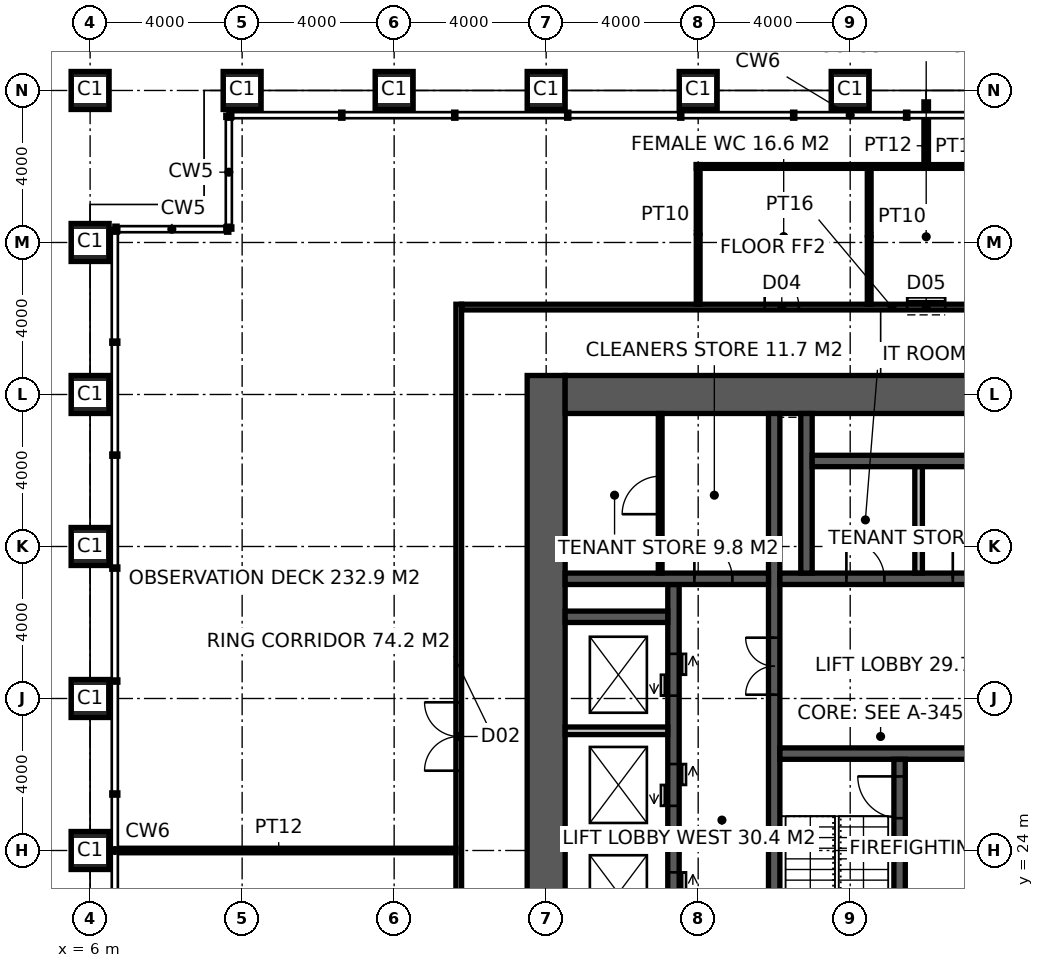
"""IFC4 building model, lengths in metres.
Left out: names, types, materials, properties, quantities, classifications, styles, units other than length and angle.
Written with IfcOpenShell. Run it as: python <this file> out.ifc"""

import sys

from ifc_helpers import new_model, si_unit, direction, frame, frame_2d, origin, origin_2d, place, context, subcontext, project, spatial, rectangle, hollow_rectangle, extrude, element, fill, save


model = new_model("IFC4")
c1 = context("Model", 3, precision=1e-05, world=origin(), true_north=direction((0.0, 1.0)))
c2 = subcontext(c1, "Body", "Model", "MODEL_VIEW")
j1 = project(units=[si_unit("LENGTHUNIT", "METRE"), si_unit("PLANEANGLEUNIT", "RADIAN")], contexts=[c1])
p1 = place(None, origin())
s1 = spatial("IfcSite", under=j1, at=p1, CompositionType="ELEMENT")
p2 = place(p1, origin())
s2 = spatial("IfcBuilding", under=s1, at=p2, CompositionType="ELEMENT")
p3 = place(p2, frame((0.0, 0.0, 298.2)))
s3 = spatial("IfcBuildingStorey", under=s2, at=p3, CompositionType="ELEMENT", Elevation=298.2)
for number, where, z_axis, x_axis in (
    (1, (6.0, 24.0, 0.0), (0.0, 0.0, 1.0), (1.0, 0.0, 0.0)),
    (2, (6.0, 28.0, 0.0), (0.0, 0.0, 1.0), (1.0, 0.0, 0.0)),
    (3, (6.0, 32.0, 0.0), (0.0, 0.0, 1.0), (1.0, 0.0, 0.0)),
    (4, (6.0, 36.0, 0.0), (0.0, 0.0, 1.0), (1.0, 0.0, 0.0)),
    (5, (6.0, 40.0, 0.0), (0.0, 0.0, 1.0), (1.0, 0.0, 0.0)),
):
    element("IfcColumn", number, at=place(p3, frame(where, z_axis=z_axis, x_axis=x_axis)), inside=s3, PredefinedType="COLUMN", context=c2, shape_type="SweptSolid", body=[
        extrude(hollow_rectangle(XDim=1.0, YDim=1.0, WallThickness=0.1, at=origin_2d()), origin(), (0.0, 0.0, 1.0), 6.0),
    ])
p4 = place(p3, frame((6.0, 44.0, 0.0), z_axis=(0.0, 0.0, 1.0), x_axis=(1.0, 0.0, 0.0)))
e6 = element("IfcColumn", 6, at=p4, inside=s3, PredefinedType="COLUMN", context=c2, shape_type="SweptSolid", body=[
    extrude(hollow_rectangle(XDim=1.0, YDim=1.0, WallThickness=0.1, at=origin_2d()), origin(), (0.0, 0.0, 1.0), 6.0),
    extrude(rectangle(XDim=0.99, YDim=0.99, at=origin_2d()), frame((0.0, 0.0, 5.96)), (0.0, 0.0, 1.0), 0.04),
])
for number, where, z_axis, x_axis in (
    (7, (10.0, 44.0, 0.0), (0.0, 0.0, 1.0), (1.0, 0.0, 0.0)),
    (8, (14.0, 44.0, 0.0), (0.0, 0.0, 1.0), (1.0, 0.0, 0.0)),
    (9, (18.0, 44.0, 0.0), (0.0, 0.0, 1.0), (1.0, 0.0, 0.0)),
    (10, (22.0, 44.0, 0.0), (0.0, 0.0, 1.0), (1.0, 0.0, 0.0)),
    (11, (26.0, 44.0, 0.0), (0.0, 0.0, 1.0), (1.0, 0.0, 0.0)),
):
    element("IfcColumn", number, at=place(p3, frame(where, z_axis=z_axis, x_axis=x_axis)), inside=s3, PredefinedType="COLUMN", context=c2, shape_type="SweptSolid", body=[
        extrude(hollow_rectangle(XDim=1.0, YDim=1.0, WallThickness=0.1, at=origin_2d()), origin(), (0.0, 0.0, 1.0), 6.0),
    ])
p5 = place(p3, frame((18.0, 17.5, -0.15), z_axis=(0.0, 0.0, 1.0), x_axis=(0.0, 1.0, 0.0)))
e12 = element("IfcWall", 12, at=p5, inside=s3, PredefinedType="SHEAR", context=c2, shape_type="SweptSolid", body=[
    extrude(rectangle(XDim=19.0, YDim=1.0, at=frame_2d((9.5, 0.0))), origin(), (0.0, 0.0, 1.0), 5.85),
])
p6 = place(p3, frame((18.5, 36.0, -0.15), z_axis=(0.0, 0.0, 1.0), x_axis=(1.0, 0.0, 0.0)))
e13 = element("IfcWall", 13, at=p6, inside=s3, PredefinedType="SHEAR", context=c2, shape_type="SweptSolid", body=[
    extrude(rectangle(XDim=17.6, YDim=1.0, at=frame_2d((8.8, 0.0))), origin(), (0.0, 0.0, 1.0), 5.85),
])
p7 = place(p3, frame((24.0, 18.5, -0.15), z_axis=(0.0, 0.0, 1.0), x_axis=(0.0, 1.0, 0.0)))
e14 = element("IfcWall", 14, at=p7, inside=s3, PredefinedType="SHEAR", context=c2, shape_type="SweptSolid", body=[
    extrude(rectangle(XDim=17.0, YDim=0.3, at=frame_2d((8.5, 0.0))), origin(), (0.0, 0.0, 1.0), 5.85),
])
p8 = place(p7, frame((9.6, 0.0, 0.15)))
e15 = element("IfcOpeningElement", 15, at=p8, cuts=e14, PredefinedType="OPENING", context=c2, shape_type="SweptSolid", body=[
    extrude(rectangle(XDim=1.5, YDim=2.4, at=frame_2d((0.75, 1.2))), frame((0.0, 0.16, 0.0), z_axis=(0.0, -1.0, 0.0), x_axis=(1.0, 0.0, 0.0)), (0.0, 0.0, 1.0), 0.32),
])
p9 = place(p3, frame((24.15, 26.55, -0.15), z_axis=(0.0, 0.0, 1.0), x_axis=(1.0, 0.0, 0.0)))
e16 = element("IfcWall", 16, at=p9, inside=s3, PredefinedType="SHEAR", context=c2, shape_type="SweptSolid", body=[
    extrude(rectangle(XDim=11.25, YDim=0.3, at=frame_2d((5.625, 0.0))), origin(), (0.0, 0.0, 1.0), 5.85),
])
p10 = place(p9, frame((9.2, 0.0, 0.15)))
e17 = element("IfcOpeningElement", 17, at=p10, cuts=e16, PredefinedType="OPENING", context=c2, shape_type="SweptSolid", body=[
    extrude(rectangle(XDim=1.1, YDim=2.2, at=frame_2d((0.55, 1.1))), frame((0.0, 0.16, 0.0), z_axis=(0.0, -1.0, 0.0), x_axis=(1.0, 0.0, 0.0)), (0.0, 0.0, 1.0), 0.32),
])
p11 = place(p9, frame((4.9, 0.0, 0.15)))
e18 = element("IfcOpeningElement", 18, at=p11, cuts=e16, PredefinedType="OPENING", context=c2, shape_type="SweptSolid", body=[
    extrude(rectangle(XDim=1.5, YDim=2.4, at=frame_2d((0.75, 1.2))), frame((0.0, 0.16, 0.0), z_axis=(0.0, -1.0, 0.0), x_axis=(1.0, 0.0, 0.0)), (0.0, 0.0, 1.0), 0.32),
])
p12 = place(p3, frame((27.3, 18.5, -0.15), z_axis=(0.0, 0.0, 1.0), x_axis=(0.0, 1.0, 0.0)))
e19 = element("IfcWall", 19, at=p12, inside=s3, PredefinedType="SHEAR", context=c2, shape_type="SweptSolid", body=[
    extrude(rectangle(XDim=7.9, YDim=0.3, at=frame_2d((3.95, 0.0))), origin(), (0.0, 0.0, 1.0), 5.85),
])
p13 = place(p12, frame((6.35, 0.0, 0.15)))
e20 = element("IfcOpeningElement", 20, at=p13, cuts=e19, PredefinedType="OPENING", context=c2, shape_type="SweptSolid", body=[
    extrude(rectangle(XDim=1.1, YDim=2.2, at=frame_2d((0.55, 1.1))), frame((0.0, 0.16, 0.0), z_axis=(0.0, -1.0, 0.0), x_axis=(1.0, 0.0, 0.0)), (0.0, 0.0, 1.0), 0.32),
])
p14 = place(p3, frame((24.15, 31.15, -0.15), z_axis=(0.0, 0.0, 1.0), x_axis=(1.0, 0.0, 0.0)))
e21 = element("IfcWall", 21, at=p14, inside=s3, PredefinedType="SHEAR", context=c2, shape_type="SweptSolid", body=[
    extrude(rectangle(XDim=11.25, YDim=0.3, at=frame_2d((5.625, 0.0))), origin(), (0.0, 0.0, 1.0), 5.85),
])
p15 = place(p14, frame((1.75, 0.0, 0.15)))
e22 = element("IfcOpeningElement", 22, at=p15, cuts=e21, PredefinedType="OPENING", context=c2, shape_type="SweptSolid", body=[
    extrude(rectangle(XDim=1.0, YDim=2.2, at=frame_2d((0.5, 1.1))), frame((0.0, 0.16, 0.0), z_axis=(0.0, -1.0, 0.0), x_axis=(1.0, 0.0, 0.0)), (0.0, 0.0, 1.0), 0.32),
])
p16 = place(p14, frame((4.55, 0.0, 0.15)))
e23 = element("IfcOpeningElement", 23, at=p16, cuts=e21, PredefinedType="OPENING", context=c2, shape_type="SweptSolid", body=[
    extrude(rectangle(XDim=1.0, YDim=2.2, at=frame_2d((0.5, 1.1))), frame((0.0, 0.16, 0.0), z_axis=(0.0, -1.0, 0.0), x_axis=(1.0, 0.0, 0.0)), (0.0, 0.0, 1.0), 0.32),
])
p17 = place(p14, frame((7.25, 0.0, 0.15)))
e24 = element("IfcOpeningElement", 24, at=p17, cuts=e21, PredefinedType="OPENING", context=c2, shape_type="SweptSolid", body=[
    extrude(rectangle(XDim=1.4, YDim=2.4, at=frame_2d((0.7, 1.2))), frame((0.0, 0.16, 0.0), z_axis=(0.0, -1.0, 0.0), x_axis=(1.0, 0.0, 0.0)), (0.0, 0.0, 1.0), 0.32),
])
p18 = place(p3, frame((21.35, 18.5, -0.15), z_axis=(0.0, 0.0, 1.0), x_axis=(0.0, 1.0, 0.0)))
e25 = element("IfcWall", 25, at=p18, inside=s3, PredefinedType="SHEAR", context=c2, shape_type="SweptSolid", body=[
    extrude(rectangle(XDim=12.5, YDim=0.3, at=frame_2d((6.25, 0.0))), origin(), (0.0, 0.0, 1.0), 5.85),
])
p19 = place(p18, frame((0.875, 0.0, 0.15)))
e26 = element("IfcOpeningElement", 26, at=p19, cuts=e25, PredefinedType="OPENING", context=c2, shape_type="SweptSolid", body=[
    extrude(rectangle(XDim=1.1, YDim=2.2, at=frame_2d((0.55, 1.1))), frame((0.0, 0.16, 0.0), z_axis=(0.0, -1.0, 0.0), x_axis=(1.0, 0.0, 0.0)), (0.0, 0.0, 1.0), 0.32),
])
p20 = place(p18, frame((3.825, 0.0, 0.15)))
e27 = element("IfcOpeningElement", 27, at=p20, cuts=e25, PredefinedType="OPENING", context=c2, shape_type="SweptSolid", body=[
    extrude(rectangle(XDim=1.1, YDim=2.2, at=frame_2d((0.55, 1.1))), frame((0.0, 0.16, 0.0), z_axis=(0.0, -1.0, 0.0), x_axis=(1.0, 0.0, 0.0)), (0.0, 0.0, 1.0), 0.32),
])
p21 = place(p18, frame((6.675, 0.0, 0.15)))
e28 = element("IfcOpeningElement", 28, at=p21, cuts=e25, PredefinedType="OPENING", context=c2, shape_type="SweptSolid", body=[
    extrude(rectangle(XDim=1.1, YDim=2.2, at=frame_2d((0.55, 1.1))), frame((0.0, 0.16, 0.0), z_axis=(0.0, -1.0, 0.0), x_axis=(1.0, 0.0, 0.0)), (0.0, 0.0, 1.0), 0.32),
])
p22 = place(p18, frame((9.575, 0.0, 0.15)))
e29 = element("IfcOpeningElement", 29, at=p22, cuts=e25, PredefinedType="OPENING", context=c2, shape_type="SweptSolid", body=[
    extrude(rectangle(XDim=1.1, YDim=2.2, at=frame_2d((0.55, 1.1))), frame((0.0, 0.16, 0.0), z_axis=(0.0, -1.0, 0.0), x_axis=(1.0, 0.0, 0.0)), (0.0, 0.0, 1.0), 0.32),
])
p23 = place(p3, frame((18.5, 31.15, -0.15), z_axis=(0.0, 0.0, 1.0), x_axis=(1.0, 0.0, 0.0)))
e30 = element("IfcWall", 30, at=p23, inside=s3, PredefinedType="SHEAR", context=c2, shape_type="SweptSolid", body=[
    extrude(rectangle(XDim=5.35, YDim=0.3, at=frame_2d((2.675, 0.0))), origin(), (0.0, 0.0, 1.0), 5.85),
])
p24 = place(p23, frame((3.4, 0.0, 0.15)))
e31 = element("IfcOpeningElement", 31, at=p24, cuts=e30, PredefinedType="OPENING", context=c2, shape_type="SweptSolid", body=[
    extrude(rectangle(XDim=1.0, YDim=2.2, at=frame_2d((0.5, 1.1))), frame((0.0, 0.16, 0.0), z_axis=(0.0, -1.0, 0.0), x_axis=(1.0, 0.0, 0.0)), (0.0, 0.0, 1.0), 0.32),
])
p25 = place(p3, frame((18.5, 30.15, -0.15), z_axis=(0.0, 0.0, 1.0), x_axis=(1.0, 0.0, 0.0)))
e32 = element("IfcWall", 32, at=p25, inside=s3, PredefinedType="SHEAR", context=c2, shape_type="SweptSolid", body=[
    extrude(rectangle(XDim=2.7, YDim=0.3, at=frame_2d((1.35, 0.0))), origin(), (0.0, 0.0, 1.0), 5.85),
])
p26 = place(p3, frame((24.85, 31.3, -0.15), z_axis=(0.0, 0.0, 1.0), x_axis=(0.0, 1.0, 0.0)))
e33 = element("IfcWall", 33, at=p26, inside=s3, PredefinedType="SHEAR", context=c2, shape_type="SweptSolid", body=[
    extrude(rectangle(XDim=4.2, YDim=0.3, at=frame_2d((2.1, 0.0))), origin(), (0.0, 0.0, 1.0), 5.85),
])
p27 = place(p3, frame((25.0, 34.25, -0.15), z_axis=(0.0, 0.0, 1.0), x_axis=(1.0, 0.0, 0.0)))
e34 = element("IfcWall", 34, at=p27, inside=s3, PredefinedType="SHEAR", context=c2, shape_type="SweptSolid", body=[
    extrude(rectangle(XDim=8.6, YDim=0.3, at=frame_2d((4.3, 0.0))), origin(), (0.0, 0.0, 1.0), 5.85),
])
p28 = place(p3, frame((27.8, 31.3, 0.0), z_axis=(0.0, 0.0, 1.0), x_axis=(0.0, 1.0, 0.0)))
e35 = element("IfcWall", 35, at=p28, inside=s3, PredefinedType="SOLIDWALL", context=c2, shape_type="SweptSolid", body=[
    extrude(rectangle(XDim=2.8, YDim=0.2, at=frame_2d((1.4, 0.0))), origin(), (0.0, 0.0, 1.0), 5.7),
])
for number, where, z_axis, x_axis in (
    (36, (18.5, 24.3, -0.15), (0.0, 0.0, 1.0), (1.0, 0.0, 0.0)),
    (37, (18.5, 27.15, -0.15), (0.0, 0.0, 1.0), (1.0, 0.0, 0.0)),
):
    element("IfcWall", number, at=place(p3, frame(where, z_axis=z_axis, x_axis=x_axis)), inside=s3, PredefinedType="SOLIDWALL", context=c2, shape_type="SweptSolid", body=[
        extrude(rectangle(XDim=2.7, YDim=0.2, at=frame_2d((1.35, 0.0))), origin(), (0.0, 0.0, 1.0), 5.85),
    ])
p29 = place(p3, frame((21.0, 31.3, 0.0), z_axis=(0.0, 0.0, 1.0), x_axis=(0.0, 1.0, 0.0)))
e38 = element("IfcWall", 38, at=p29, inside=s3, PredefinedType="PARTITIONING", context=c2, shape_type="SweptSolid", body=[
    extrude(rectangle(XDim=4.2, YDim=0.1, at=frame_2d((2.1, 0.0))), origin(), (0.0, 0.0, 1.0), 5.7),
])
p30 = place(p29, frame((1.55, 0.0, 0.0)))
e39 = element("IfcOpeningElement", 39, at=p30, cuts=e38, PredefinedType="OPENING", context=c2, shape_type="SweptSolid", body=[
    extrude(rectangle(XDim=1.0, YDim=2.2, at=frame_2d((0.5, 1.1))), frame((0.0, 0.06, 0.0), z_axis=(0.0, -1.0, 0.0), x_axis=(1.0, 0.0, 0.0)), (0.0, 0.0, 1.0), 0.12),
])
p31 = place(p3, frame((15.7, 15.625, 0.0), z_axis=(0.0, 0.0, 1.0), x_axis=(0.0, 1.0, 0.0)))
e40 = element("IfcWall", 40, at=p31, inside=s3, PredefinedType="PARTITIONING", context=c2, shape_type="SweptSolid", body=[
    extrude(rectangle(XDim=22.75, YDim=0.15, at=frame_2d((11.375, 0.0))), origin(), (0.0, 0.0, 1.0), 5.7),
])
p32 = place(p31, frame((10.475, 0.0, 0.0)))
e41 = element("IfcOpeningElement", 41, at=p32, cuts=e40, PredefinedType="OPENING", context=c2, shape_type="SweptSolid", body=[
    extrude(rectangle(XDim=1.8, YDim=2.4, at=frame_2d((0.9, 1.2))), frame((0.0, 0.085, 0.0), z_axis=(0.0, -1.0, 0.0), x_axis=(1.0, 0.0, 0.0)), (0.0, 0.0, 1.0), 0.17),
])
p33 = place(p3, frame((15.775, 38.3, 0.0), z_axis=(0.0, 0.0, 1.0), x_axis=(1.0, 0.0, 0.0)))
e42 = element("IfcWall", 42, at=p33, inside=s3, PredefinedType="PARTITIONING", context=c2, shape_type="SweptSolid", body=[
    extrude(rectangle(XDim=22.65, YDim=0.15, at=frame_2d((11.325, 0.0))), origin(), (0.0, 0.0, 1.0), 5.7),
])
p34 = place(p33, frame((7.975, 0.0, 0.0)))
e43 = element("IfcOpeningElement", 43, at=p34, cuts=e42, PredefinedType="OPENING", context=c2, shape_type="SweptSolid", body=[
    extrude(rectangle(XDim=0.9, YDim=2.1, at=frame_2d((0.45, 1.05))), frame((0.0, 0.085, 0.0), z_axis=(0.0, -1.0, 0.0), x_axis=(1.0, 0.0, 0.0)), (0.0, 0.0, 1.0), 0.17),
])
p35 = place(p33, frame((11.725, 0.0, 0.0)))
e44 = element("IfcOpeningElement", 44, at=p35, cuts=e42, PredefinedType="OPENING", context=c2, shape_type="SweptSolid", body=[
    extrude(rectangle(XDim=1.0, YDim=2.1, at=frame_2d((0.5, 1.05))), frame((0.0, 0.085, 0.0), z_axis=(0.0, -1.0, 0.0), x_axis=(1.0, 0.0, 0.0)), (0.0, 0.0, 1.0), 0.17),
])
p36 = place(p33, frame((15.575, 0.0, 0.0)))
e45 = element("IfcOpeningElement", 45, at=p36, cuts=e42, PredefinedType="OPENING", context=c2, shape_type="SweptSolid", body=[
    extrude(rectangle(XDim=0.9, YDim=2.1, at=frame_2d((0.45, 1.05))), frame((0.0, 0.085, 0.0), z_axis=(0.0, -1.0, 0.0), x_axis=(1.0, 0.0, 0.0)), (0.0, 0.0, 1.0), 0.17),
])
p37 = place(p3, frame((6.3, 24.0, 0.0), z_axis=(0.0, 0.0, 1.0), x_axis=(1.0, 0.0, 0.0)))
e46 = element("IfcWall", 46, at=p37, inside=s3, PredefinedType="PARTITIONING", context=c2, shape_type="SweptSolid", body=[
    extrude(rectangle(XDim=9.325, YDim=0.12, at=frame_2d((4.663, 0.0))), origin(), (0.0, 0.0, 1.0), 4.8),
])
p38 = place(p3, frame((22.0, 38.375, 0.0), z_axis=(0.0, 0.0, 1.0), x_axis=(0.0, 1.0, 0.0)))
e47 = element("IfcWall", 47, at=p38, inside=s3, PredefinedType="PARTITIONING", context=c2, shape_type="SweptSolid", body=[
    extrude(rectangle(XDim=3.675, YDim=0.1, at=frame_2d((1.837, 0.0))), origin(), (0.0, 0.0, 1.0), 4.8),
])
p39 = place(p3, frame((21.95, 42.0, 0.0), z_axis=(0.0, 0.0, 1.0), x_axis=(1.0, 0.0, 0.0)))
e48 = element("IfcWall", 48, at=p39, inside=s3, PredefinedType="PARTITIONING", context=c2, shape_type="SweptSolid", body=[
    extrude(rectangle(XDim=12.1, YDim=0.1, at=frame_2d((6.05, 0.0))), origin(), (0.0, 0.0, 1.0), 5.7),
])
p40 = place(p3, frame((26.5, 38.375, 0.0), z_axis=(0.0, 0.0, 1.0), x_axis=(0.0, 1.0, 0.0)))
e49 = element("IfcWall", 49, at=p40, inside=s3, PredefinedType="PARTITIONING", context=c2, shape_type="SweptSolid", body=[
    extrude(rectangle(XDim=3.575, YDim=0.1, at=frame_2d((1.788, 0.0))), origin(), (0.0, 0.0, 1.0), 5.7),
])
p41 = place(p3, frame((28.0, 42.05, 0.0), z_axis=(0.0, 0.0, 1.0), x_axis=(0.0, 1.0, 0.0)))
e50 = element("IfcWall", 50, at=p41, inside=s3, PredefinedType="PARTITIONING", context=c2, shape_type="SweptSolid", body=[
    extrude(rectangle(XDim=1.65, YDim=0.12, at=frame_2d((0.825, 0.0))), origin(), (0.0, 0.0, 1.0), 5.7),
])
p42 = place(p13, origin())
e51 = element("IfcDoor", 51, at=p42, inside=s3, OperationType="SINGLE_SWING_RIGHT", PredefinedType="DOOR", context=c2, shape_type="SweptSolid", body=[
    extrude(rectangle(XDim=1.1, YDim=2.2, at=frame_2d((0.55, 1.1))), frame((0.0, 0.025, 0.0), z_axis=(0.0, -1.0, 0.0), x_axis=(1.0, 0.0, 0.0)), (0.0, 0.0, 1.0), 0.05),
])
fill(e20, e51)
p43 = place(p8, origin())
e52 = element("IfcDoor", 52, at=p43, inside=s3, OperationType="DOUBLE_DOOR_DOUBLE_SWING", PredefinedType="DOOR", context=c2, shape_type="SweptSolid", body=[
    extrude(rectangle(XDim=1.5, YDim=2.4, at=frame_2d((0.75, 1.2))), frame((0.0, 0.025, 0.0), z_axis=(0.0, -1.0, 0.0), x_axis=(1.0, 0.0, 0.0)), (0.0, 0.0, 1.0), 0.05),
])
fill(e15, e52)
p44 = place(p24, origin())
e53 = element("IfcDoor", 53, at=p44, inside=s3, OperationType="SINGLE_SWING_LEFT", PredefinedType="DOOR", context=c2, shape_type="SweptSolid", body=[
    extrude(rectangle(XDim=1.0, YDim=2.2, at=frame_2d((0.5, 1.1))), frame((0.0, 0.025, 0.0), z_axis=(0.0, -1.0, 0.0), x_axis=(1.0, 0.0, 0.0)), (0.0, 0.0, 1.0), 0.05),
])
fill(e31, e53)
p45 = place(p30, origin())
e54 = element("IfcDoor", 54, at=p45, inside=s3, OperationType="SINGLE_SWING_LEFT", PredefinedType="DOOR", context=c2, shape_type="SweptSolid", body=[
    extrude(rectangle(XDim=1.0, YDim=2.2, at=frame_2d((0.5, 1.1))), frame((0.0, 0.025, 0.0), z_axis=(0.0, -1.0, 0.0), x_axis=(1.0, 0.0, 0.0)), (0.0, 0.0, 1.0), 0.05),
])
fill(e39, e54)
p46 = place(p15, origin())
e55 = element("IfcDoor", 55, at=p46, inside=s3, OperationType="SINGLE_SWING_LEFT", PredefinedType="DOOR", context=c2, shape_type="SweptSolid", body=[
    extrude(rectangle(XDim=1.0, YDim=2.2, at=frame_2d((0.5, 1.1))), frame((0.0, 0.025, 0.0), z_axis=(0.0, -1.0, 0.0), x_axis=(1.0, 0.0, 0.0)), (0.0, 0.0, 1.0), 0.05),
])
fill(e22, e55)
p47 = place(p16, origin())
e56 = element("IfcDoor", 56, at=p47, inside=s3, OperationType="SINGLE_SWING_LEFT", PredefinedType="DOOR", context=c2, shape_type="SweptSolid", body=[
    extrude(rectangle(XDim=1.0, YDim=2.2, at=frame_2d((0.5, 1.1))), frame((0.0, 0.025, 0.0), z_axis=(0.0, -1.0, 0.0), x_axis=(1.0, 0.0, 0.0)), (0.0, 0.0, 1.0), 0.05),
])
fill(e23, e56)
p48 = place(p34, origin())
e57 = element("IfcDoor", 57, at=p48, inside=s3, OperationType="SINGLE_SWING_LEFT", PredefinedType="DOOR", context=c2, shape_type="SweptSolid", body=[
    extrude(rectangle(XDim=0.9, YDim=2.1, at=frame_2d((0.45, 1.05))), frame((0.0, 0.025, 0.0), z_axis=(0.0, -1.0, 0.0), x_axis=(1.0, 0.0, 0.0)), (0.0, 0.0, 1.0), 0.05),
])
fill(e43, e57)
p49 = place(p35, origin())
e58 = element("IfcDoor", 58, at=p49, inside=s3, OperationType="SLIDING_TO_LEFT", PredefinedType="DOOR", context=c2, shape_type="SweptSolid", body=[
    extrude(rectangle(XDim=1.0, YDim=2.1, at=frame_2d((0.5, 1.05))), frame((0.0, 0.025, 0.0), z_axis=(0.0, -1.0, 0.0), x_axis=(1.0, 0.0, 0.0)), (0.0, 0.0, 1.0), 0.05),
])
fill(e44, e58)
p50 = place(p32, origin())
e59 = element("IfcDoor", 59, at=p50, inside=s3, OperationType="DOUBLE_DOOR_DOUBLE_SWING", PredefinedType="DOOR", context=c2, shape_type="SweptSolid", body=[
    extrude(rectangle(XDim=1.8, YDim=2.4, at=frame_2d((0.9, 1.2))), frame((0.0, 0.025, 0.0), z_axis=(0.0, -1.0, 0.0), x_axis=(1.0, 0.0, 0.0)), (0.0, 0.0, 1.0), 0.05),
])
fill(e41, e59)
p51 = place(p20, origin())
e60 = element("IfcDoor", 60, at=p51, inside=s3, OperationType="DOUBLE_DOOR_SLIDING", PredefinedType="DOOR", context=c2, shape_type="SweptSolid", body=[
    extrude(rectangle(XDim=1.1, YDim=2.2, at=frame_2d((0.55, 1.1))), frame((0.0, 0.025, 0.0), z_axis=(0.0, -1.0, 0.0), x_axis=(1.0, 0.0, 0.0)), (0.0, 0.0, 1.0), 0.05),
])
fill(e27, e60)
p52 = place(p21, origin())
e61 = element("IfcDoor", 61, at=p52, inside=s3, OperationType="DOUBLE_DOOR_SLIDING", PredefinedType="DOOR", context=c2, shape_type="SweptSolid", body=[
    extrude(rectangle(XDim=1.1, YDim=2.2, at=frame_2d((0.55, 1.1))), frame((0.0, 0.025, 0.0), z_axis=(0.0, -1.0, 0.0), x_axis=(1.0, 0.0, 0.0)), (0.0, 0.0, 1.0), 0.05),
])
fill(e28, e61)
p53 = place(p22, origin())
e62 = element("IfcDoor", 62, at=p53, inside=s3, OperationType="DOUBLE_DOOR_SLIDING", PredefinedType="DOOR", context=c2, shape_type="SweptSolid", body=[
    extrude(rectangle(XDim=1.1, YDim=2.2, at=frame_2d((0.55, 1.1))), frame((0.0, 0.025, 0.0), z_axis=(0.0, -1.0, 0.0), x_axis=(1.0, 0.0, 0.0)), (0.0, 0.0, 1.0), 0.05),
])
fill(e29, e62)
save(model, sys.argv[1])
